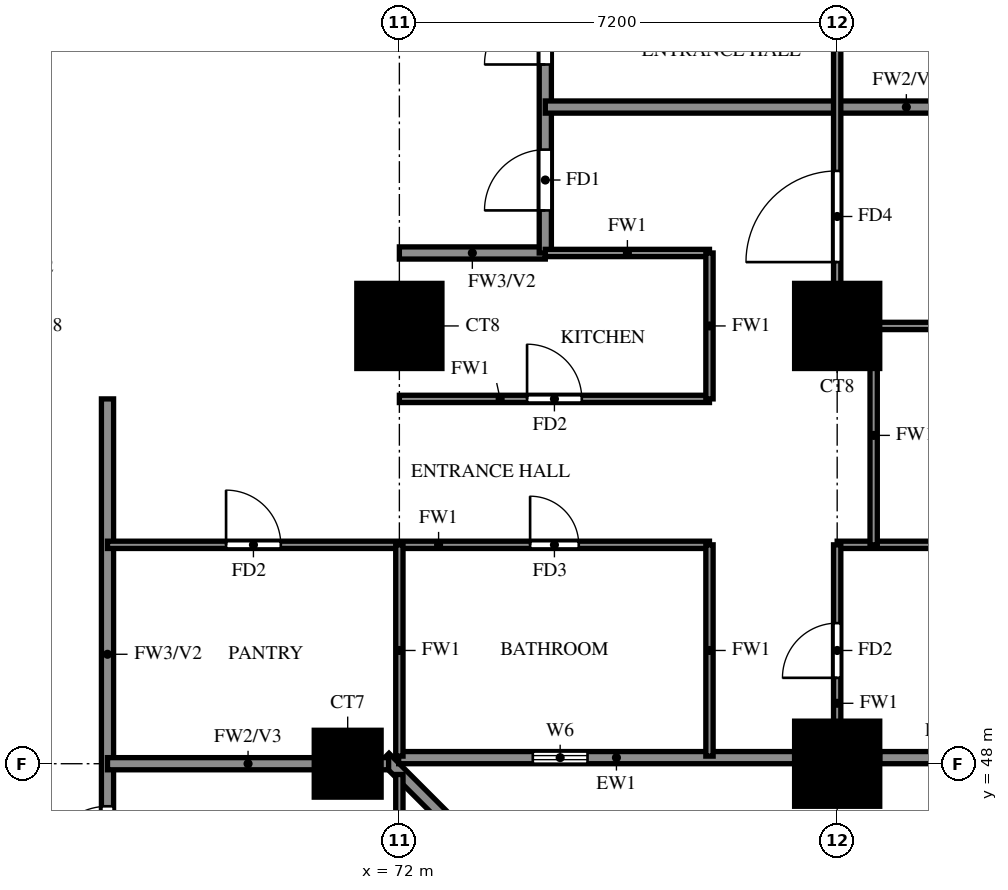
"""IFC4 building model, lengths in metres.
Left out: names, types, materials, properties, quantities, classifications, styles, units other than length and angle.
Written with IfcOpenShell. Run it as: python <this file> out.ifc"""

import sys

from ifc_helpers import new_model, si_unit, direction, frame, frame_2d, origin, origin_2d, place, context, subcontext, project, spatial, rectangle, extrude, source, transform, mapped, element, fill, save


model = new_model("IFC4")
c1 = context("Model", 3, precision=1e-05, world=origin(), true_north=direction((0.0, 1.0)))
c2 = subcontext(c1, "Body", "Model", "MODEL_VIEW")
j1 = project(units=[si_unit("LENGTHUNIT", "METRE"), si_unit("PLANEANGLEUNIT", "RADIAN")], contexts=[c1])
p1 = place(None, origin())
s1 = spatial("IfcSite", under=j1, at=p1, CompositionType="ELEMENT")
p2 = place(p1, origin())
s2 = spatial("IfcBuilding", under=s1, at=p2, CompositionType="ELEMENT")
p3 = place(p2, frame((0.0, 0.0, 51.5)))
s3 = spatial("IfcBuildingStorey", under=s2, at=p3, CompositionType="ELEMENT", Elevation=51.5)
m1 = source(origin(), c2, "Body", "SweptSolid", [
    extrude(rectangle(XDim=1.1, YDim=1.1, at=origin_2d()), origin(), (0.0, 0.0, 1.0), 3.18),
])
p4 = place(p3, frame((71.15, 48.0, 0.0), z_axis=(0.0, 0.0, 1.0), x_axis=(1.0, 0.0, 0.0)))
e1 = element("IfcColumn", 1, at=p4, inside=s3, PredefinedType="COLUMN", context=c2, shape_type="MappedRepresentation", body=[
    mapped(m1, transform((0.0, 0.0, 0.0))),
])
m2 = source(origin(), c2, "Body", "SweptSolid", [
    extrude(rectangle(XDim=1.4, YDim=1.4, at=origin_2d()), origin(), (0.0, 0.0, 1.0), 3.18),
])
for number, where, z_axis, x_axis in (
    (2, (79.2, 48.0, 0.0), (0.0, 0.0, 1.0), (1.0, 0.0, 0.0)),
    (3, (72.0, 55.2, 0.0), (0.0, 0.0, 1.0), (1.0, 0.0, 0.0)),
    (4, (79.2, 55.2, 0.0), (0.0, 0.0, 1.0), (1.0, 0.0, 0.0)),
):
    element("IfcColumn", number, at=place(p3, frame(where, z_axis=z_axis, x_axis=x_axis)), inside=s3, PredefinedType="COLUMN", context=c2, shape_type="MappedRepresentation", body=[
        mapped(m2, transform((0.0, 0.0, 0.0))),
    ])
p5 = place(p3, frame((78.74, 41.118, 0.0), z_axis=(0.0, 0.0, 1.0), x_axis=(-0.707106781187, 0.707106781187, 0.0)))
e5 = element("IfcWall", 5, at=p5, inside=s3, PredefinedType="SOLIDWALL", context=c2, shape_type="SweptSolid", body=[
    extrude(rectangle(XDim=9.874, YDim=0.2, at=frame_2d((4.937, 0.0))), origin(), (0.0, 0.0, 1.0), 3.18),
])
p6 = place(p5, frame((2.264, 0.0, 0.6)))
e6 = element("IfcOpeningElement", 6, at=p6, cuts=e5, PredefinedType="OPENING", context=c2, shape_type="SweptSolid", body=[
    extrude(rectangle(XDim=2.4, YDim=2.4, at=frame_2d((1.2, 1.2))), frame((0.0, 0.11, 0.0), z_axis=(0.0, -1.0, 0.0), x_axis=(1.0, 0.0, 0.0)), (0.0, 0.0, 1.0), 0.22),
])
p7 = place(p5, frame((5.836, 0.0, 0.6)))
e7 = element("IfcOpeningElement", 7, at=p7, cuts=e5, PredefinedType="OPENING", context=c2, shape_type="SweptSolid", body=[
    extrude(rectangle(XDim=2.4, YDim=2.4, at=frame_2d((1.2, 1.2))), frame((0.0, 0.11, 0.0), z_axis=(0.0, -1.0, 0.0), x_axis=(1.0, 0.0, 0.0)), (0.0, 0.0, 1.0), 0.22),
])
p8 = place(p3, frame((71.989, 48.1, 0.0), z_axis=(0.0, 0.0, 1.0), x_axis=(1.0, 0.0, 0.0)))
e8 = element("IfcWall", 8, at=p8, inside=s3, PredefinedType="SOLIDWALL", context=c2, shape_type="SweptSolid", body=[
    extrude(rectangle(XDim=6.511, YDim=0.2, at=frame_2d((3.256, 0.0))), origin(), (0.0, 0.0, 1.0), 3.18),
])
p9 = place(p8, frame((2.206, 0.0, 1.5)))
e9 = element("IfcOpeningElement", 9, at=p9, cuts=e8, PredefinedType="OPENING", context=c2, shape_type="SweptSolid", body=[
    extrude(rectangle(XDim=0.9, YDim=0.9, at=frame_2d((0.45, 0.45))), frame((0.0, 0.11, 0.0), z_axis=(0.0, -1.0, 0.0), x_axis=(1.0, 0.0, 0.0)), (0.0, 0.0, 1.0), 0.22),
])
p10 = place(p3, frame((79.9, 48.1, 0.0), z_axis=(0.0, 0.0, 1.0), x_axis=(1.0, 0.0, 0.0)))
e10 = element("IfcWall", 10, at=p10, inside=s3, PredefinedType="SOLIDWALL", context=c2, shape_type="SweptSolid", body=[
    extrude(rectangle(XDim=5.35, YDim=0.2, at=frame_2d((2.675, 0.0))), origin(), (0.0, 0.0, 1.0), 3.18),
])
p11 = place(p10, frame((1.475, 0.0, 0.6)))
e11 = element("IfcOpeningElement", 11, at=p11, cuts=e10, PredefinedType="OPENING", context=c2, shape_type="SweptSolid", body=[
    extrude(rectangle(XDim=2.4, YDim=2.4, at=frame_2d((1.2, 1.2))), frame((0.0, 0.11, 0.0), z_axis=(0.0, -1.0, 0.0), x_axis=(1.0, 0.0, 0.0)), (0.0, 0.0, 1.0), 0.22),
])
p12 = place(p3, frame((72.0, 56.4, 0.0), z_axis=(0.0, 0.0, 1.0), x_axis=(1.0, 0.0, 0.0)))
e12 = element("IfcWall", 12, at=p12, inside=s3, PredefinedType="SOLIDWALL", context=c2, shape_type="SweptSolid", body=[
    extrude(rectangle(XDim=2.4, YDim=0.2, at=frame_2d((1.2, 0.0))), origin(), (0.0, 0.0, 1.0), 3.18),
])
p13 = place(p3, frame((67.2, 45.6, 0.0), z_axis=(0.0, 0.0, 1.0), x_axis=(0.0, 1.0, 0.0)))
e13 = element("IfcWall", 13, at=p13, inside=s3, PredefinedType="SOLIDWALL", context=c2, shape_type="SweptSolid", body=[
    extrude(rectangle(XDim=8.4, YDim=0.2, at=frame_2d((4.2, 0.0))), origin(), (0.0, 0.0, 1.0), 3.18),
])
p14 = place(p13, frame((0.7, 0.0, 0.0)))
e14 = element("IfcOpeningElement", 14, at=p14, cuts=e13, PredefinedType="OPENING", context=c2, shape_type="SweptSolid", body=[
    extrude(rectangle(XDim=1.0, YDim=2.1, at=frame_2d((0.5, 1.05))), frame((0.0, 0.11, 0.0), z_axis=(0.0, -1.0, 0.0), x_axis=(1.0, 0.0, 0.0)), (0.0, 0.0, 1.0), 0.22),
])
p15 = place(p3, frame((74.4, 56.4, 0.0), z_axis=(0.0, 0.0, 1.0), x_axis=(0.0, 1.0, 0.0)))
e15 = element("IfcWall", 15, at=p15, inside=s3, PredefinedType="SOLIDWALL", context=c2, shape_type="SweptSolid", body=[
    extrude(rectangle(XDim=9.6, YDim=0.2, at=frame_2d((4.8, 0.0))), origin(), (0.0, 0.0, 1.0), 3.18),
])
p16 = place(p15, frame((0.7, 0.0, 0.0)))
e16 = element("IfcOpeningElement", 16, at=p16, cuts=e15, PredefinedType="OPENING", context=c2, shape_type="SweptSolid", body=[
    extrude(rectangle(XDim=1.0, YDim=2.1, at=frame_2d((0.5, 1.05))), frame((0.0, 0.11, 0.0), z_axis=(0.0, -1.0, 0.0), x_axis=(1.0, 0.0, 0.0)), (0.0, 0.0, 1.0), 0.22),
])
p17 = place(p15, frame((3.1, 0.0, 0.0)))
e17 = element("IfcOpeningElement", 17, at=p17, cuts=e15, PredefinedType="OPENING", context=c2, shape_type="SweptSolid", body=[
    extrude(rectangle(XDim=1.0, YDim=2.1, at=frame_2d((0.5, 1.05))), frame((0.0, 0.11, 0.0), z_axis=(0.0, -1.0, 0.0), x_axis=(1.0, 0.0, 0.0)), (0.0, 0.0, 1.0), 0.22),
])
p18 = place(p3, frame((67.2, 48.0, 0.0), z_axis=(0.0, 0.0, 1.0), x_axis=(1.0, 0.0, 0.0)))
e18 = element("IfcWall", 18, at=p18, inside=s3, PredefinedType="SOLIDWALL", context=c2, shape_type="SweptSolid", body=[
    extrude(rectangle(XDim=4.623, YDim=0.2, at=frame_2d((2.312, 0.0))), origin(), (0.0, 0.0, 1.0), 3.18),
])
p19 = place(p3, frame((74.4, 58.8, 0.0), z_axis=(0.0, 0.0, 1.0), x_axis=(1.0, 0.0, 0.0)))
e19 = element("IfcWall", 19, at=p19, inside=s3, PredefinedType="SOLIDWALL", context=c2, shape_type="SweptSolid", body=[
    extrude(rectangle(XDim=11.875, YDim=0.2, at=frame_2d((5.938, 0.0))), origin(), (0.0, 0.0, 1.0), 2.28),
])
p20 = place(p3, frame((67.2, 51.6, 0.0), z_axis=(0.0, 0.0, 1.0), x_axis=(1.0, 0.0, 0.0)))
e20 = element("IfcWall", 20, at=p20, inside=s3, PredefinedType="PARTITIONING", context=c2, shape_type="SweptSolid", body=[
    extrude(rectangle(XDim=9.9, YDim=0.12, at=frame_2d((4.95, 0.0))), origin(), (0.0, 0.0, 1.0), 3.18),
])
p21 = place(p20, frame((6.95, 0.0, 0.0)))
e21 = element("IfcOpeningElement", 21, at=p21, cuts=e20, PredefinedType="OPENING", context=c2, shape_type="SweptSolid", body=[
    extrude(rectangle(XDim=0.8, YDim=2.1, at=frame_2d((0.4, 1.05))), frame((0.0, 0.07, 0.0), z_axis=(0.0, -1.0, 0.0), x_axis=(1.0, 0.0, 0.0)), (0.0, 0.0, 1.0), 0.14),
])
p22 = place(p20, frame((1.95, 0.0, 0.0)))
e22 = element("IfcOpeningElement", 22, at=p22, cuts=e20, PredefinedType="OPENING", context=c2, shape_type="SweptSolid", body=[
    extrude(rectangle(XDim=0.9, YDim=2.1, at=frame_2d((0.45, 1.05))), frame((0.0, 0.07, 0.0), z_axis=(0.0, -1.0, 0.0), x_axis=(1.0, 0.0, 0.0)), (0.0, 0.0, 1.0), 0.14),
])
p23 = place(p3, frame((79.2, 51.6, 0.0), z_axis=(0.0, 0.0, 1.0), x_axis=(1.0, 0.0, 0.0)))
e23 = element("IfcWall", 23, at=p23, inside=s3, PredefinedType="PARTITIONING", context=c2, shape_type="SweptSolid", body=[
    extrude(rectangle(XDim=7.075, YDim=0.12, at=frame_2d((3.538, 0.0))), origin(), (0.0, 0.0, 1.0), 2.28),
])
p24 = place(p23, frame((3.438, 0.0, 0.0)))
e24 = element("IfcOpeningElement", 24, at=p24, cuts=e23, PredefinedType="OPENING", context=c2, shape_type="SweptSolid", body=[
    extrude(rectangle(XDim=0.8, YDim=2.1, at=frame_2d((0.4, 1.05))), frame((0.0, 0.07, 0.0), z_axis=(0.0, -1.0, 0.0), x_axis=(1.0, 0.0, 0.0)), (0.0, 0.0, 1.0), 0.14),
])
p25 = place(p3, frame((72.0, 54.0, 0.0), z_axis=(0.0, 0.0, 1.0), x_axis=(1.0, 0.0, 0.0)))
e25 = element("IfcWall", 25, at=p25, inside=s3, PredefinedType="PARTITIONING", context=c2, shape_type="SweptSolid", body=[
    extrude(rectangle(XDim=5.1, YDim=0.12, at=frame_2d((2.55, 0.0))), origin(), (0.0, 0.0, 1.0), 3.18),
])
p26 = place(p25, frame((2.1, 0.0, 0.0)))
e26 = element("IfcOpeningElement", 26, at=p26, cuts=e25, PredefinedType="OPENING", context=c2, shape_type="SweptSolid", body=[
    extrude(rectangle(XDim=0.9, YDim=2.1, at=frame_2d((0.45, 1.05))), frame((0.0, 0.07, 0.0), z_axis=(0.0, -1.0, 0.0), x_axis=(1.0, 0.0, 0.0)), (0.0, 0.0, 1.0), 0.14),
])
p27 = place(p3, frame((79.2, 55.2, 0.0), z_axis=(0.0, 0.0, 1.0), x_axis=(1.0, 0.0, 0.0)))
e27 = element("IfcWall", 27, at=p27, inside=s3, PredefinedType="PARTITIONING", context=c2, shape_type="SweptSolid", body=[
    extrude(rectangle(XDim=7.075, YDim=0.12, at=frame_2d((3.538, 0.0))), origin(), (0.0, 0.0, 1.0), 3.18),
])
p28 = place(p3, frame((74.4, 56.4, 0.0), z_axis=(0.0, 0.0, 1.0), x_axis=(1.0, 0.0, 0.0)))
e28 = element("IfcWall", 28, at=p28, inside=s3, PredefinedType="PARTITIONING", context=c2, shape_type="SweptSolid", body=[
    extrude(rectangle(XDim=2.7, YDim=0.12, at=frame_2d((1.35, 0.0))), origin(), (0.0, 0.0, 1.0), 3.18),
])
p29 = place(p3, frame((72.0, 33.725, 0.0), z_axis=(0.0, 0.0, 1.0), x_axis=(0.0, 1.0, 0.0)))
e29 = element("IfcWall", 29, at=p29, inside=s3, PredefinedType="PARTITIONING", context=c2, shape_type="SweptSolid", body=[
    extrude(rectangle(XDim=14.098, YDim=0.12, at=frame_2d((7.049, 0.0))), origin(), (0.0, 0.0, 1.0), 2.28),
])
p30 = place(p29, frame((10.075, 0.0, 0.0)))
e30 = element("IfcOpeningElement", 30, at=p30, cuts=e29, PredefinedType="OPENING", context=c2, shape_type="SweptSolid", body=[
    extrude(rectangle(XDim=0.9, YDim=2.1, at=frame_2d((0.45, 1.05))), frame((0.0, 0.07, 0.0), z_axis=(0.0, -1.0, 0.0), x_axis=(1.0, 0.0, 0.0)), (0.0, 0.0, 1.0), 0.14),
])
for number, where, z_axis, x_axis in (
    (31, (72.0, 48.125, 0.0), (0.0, 0.0, 1.0), (0.0, 1.0, 0.0)),
    (32, (77.1, 48.125, 0.0), (0.0, 0.0, 1.0), (0.0, 1.0, 0.0)),
):
    element("IfcWall", number, at=place(p3, frame(where, z_axis=z_axis, x_axis=x_axis)), inside=s3, PredefinedType="PARTITIONING", context=c2, shape_type="SweptSolid", body=[
        extrude(rectangle(XDim=3.475, YDim=0.12, at=frame_2d((1.738, 0.0))), origin(), (0.0, 0.0, 1.0), 3.18),
    ])
p31 = place(p3, frame((77.1, 54.0, 0.0), z_axis=(0.0, 0.0, 1.0), x_axis=(0.0, 1.0, 0.0)))
e33 = element("IfcWall", 33, at=p31, inside=s3, PredefinedType="PARTITIONING", context=c2, shape_type="SweptSolid", body=[
    extrude(rectangle(XDim=2.4, YDim=0.12, at=frame_2d((1.2, 0.0))), origin(), (0.0, 0.0, 1.0), 3.18),
])
p32 = place(p3, frame((79.2, 48.125, 0.0), z_axis=(0.0, 0.0, 1.0), x_axis=(0.0, 1.0, 0.0)))
e34 = element("IfcWall", 34, at=p32, inside=s3, PredefinedType="PARTITIONING", context=c2, shape_type="SweptSolid", body=[
    extrude(rectangle(XDim=3.475, YDim=0.12, at=frame_2d((1.738, 0.0))), origin(), (0.0, 0.0, 1.0), 3.18),
])
p33 = place(p32, frame((1.288, 0.0, 0.0)))
e35 = element("IfcOpeningElement", 35, at=p33, cuts=e34, PredefinedType="OPENING", context=c2, shape_type="SweptSolid", body=[
    extrude(rectangle(XDim=0.9, YDim=2.1, at=frame_2d((0.45, 1.05))), frame((0.0, 0.07, 0.0), z_axis=(0.0, -1.0, 0.0), x_axis=(1.0, 0.0, 0.0)), (0.0, 0.0, 1.0), 0.14),
])
p34 = place(p3, frame((79.2, 55.2, 0.0), z_axis=(0.0, 0.0, 1.0), x_axis=(0.0, 1.0, 0.0)))
e36 = element("IfcWall", 36, at=p34, inside=s3, PredefinedType="PARTITIONING", context=c2, shape_type="SweptSolid", body=[
    extrude(rectangle(XDim=14.4, YDim=0.12, at=frame_2d((7.2, 0.0))), origin(), (0.0, 0.0, 1.0), 3.18),
])
p35 = place(p34, frame((1.05, 0.0, 0.0)))
e37 = element("IfcOpeningElement", 37, at=p35, cuts=e36, PredefinedType="OPENING", context=c2, shape_type="SweptSolid", body=[
    extrude(rectangle(XDim=1.5, YDim=2.1, at=frame_2d((0.75, 1.05))), frame((0.0, 0.07, 0.0), z_axis=(0.0, -1.0, 0.0), x_axis=(1.0, 0.0, 0.0)), (0.0, 0.0, 1.0), 0.14),
])
p36 = place(p34, frame((4.95, 0.0, 0.0)))
e38 = element("IfcOpeningElement", 38, at=p36, cuts=e36, PredefinedType="OPENING", context=c2, shape_type="SweptSolid", body=[
    extrude(rectangle(XDim=0.9, YDim=2.1, at=frame_2d((0.45, 1.05))), frame((0.0, 0.07, 0.0), z_axis=(0.0, -1.0, 0.0), x_axis=(1.0, 0.0, 0.0)), (0.0, 0.0, 1.0), 0.14),
])
p37 = place(p34, frame((10.35, 0.0, 0.0)))
e39 = element("IfcOpeningElement", 39, at=p37, cuts=e36, PredefinedType="OPENING", context=c2, shape_type="SweptSolid", body=[
    extrude(rectangle(XDim=0.9, YDim=2.1, at=frame_2d((0.45, 1.05))), frame((0.0, 0.07, 0.0), z_axis=(0.0, -1.0, 0.0), x_axis=(1.0, 0.0, 0.0)), (0.0, 0.0, 1.0), 0.14),
])
p38 = place(p3, frame((79.8, 51.6, 0.0), z_axis=(0.0, 0.0, 1.0), x_axis=(0.0, 1.0, 0.0)))
e40 = element("IfcWall", 40, at=p38, inside=s3, PredefinedType="PARTITIONING", context=c2, shape_type="SweptSolid", body=[
    extrude(rectangle(XDim=3.6, YDim=0.12, at=frame_2d((1.8, 0.0))), origin(), (0.0, 0.0, 1.0), 3.18),
])
p39 = place(p9, origin())
e41 = element("IfcWindow", 41, at=p39, inside=s3, PartitioningType="SINGLE_PANEL", PredefinedType="WINDOW", context=c2, shape_type="SweptSolid", body=[
    extrude(rectangle(XDim=0.9, YDim=0.9, at=frame_2d((0.45, 0.45))), frame((0.0, 0.03, 0.0), z_axis=(0.0, -1.0, 0.0), x_axis=(1.0, 0.0, 0.0)), (0.0, 0.0, 1.0), 0.06),
])
fill(e9, e41)
p40 = place(p16, origin())
e42 = element("IfcDoor", 42, at=p40, inside=s3, OperationType="SINGLE_SWING_LEFT", PredefinedType="DOOR", context=c2, shape_type="SweptSolid", body=[
    extrude(rectangle(XDim=1.0, YDim=2.1, at=frame_2d((0.5, 1.05))), frame((0.0, 0.025, 0.0), z_axis=(0.0, -1.0, 0.0), x_axis=(1.0, 0.0, 0.0)), (0.0, 0.0, 1.0), 0.05),
])
fill(e16, e42)
p41 = place(p33, origin())
e43 = element("IfcDoor", 43, at=p41, inside=s3, OperationType="SINGLE_SWING_RIGHT", PredefinedType="DOOR", context=c2, shape_type="SweptSolid", body=[
    extrude(rectangle(XDim=0.9, YDim=2.1, at=frame_2d((0.45, 1.05))), frame((0.0, 0.025, 0.0), z_axis=(0.0, -1.0, 0.0), x_axis=(1.0, 0.0, 0.0)), (0.0, 0.0, 1.0), 0.05),
])
fill(e35, e43)
p42 = place(p35, origin())
e44 = element("IfcDoor", 44, at=p42, inside=s3, OperationType="SINGLE_SWING_LEFT", PredefinedType="DOOR", context=c2, shape_type="SweptSolid", body=[
    extrude(rectangle(XDim=1.5, YDim=2.1, at=frame_2d((0.75, 1.05))), frame((0.0, 0.025, 0.0), z_axis=(0.0, -1.0, 0.0), x_axis=(1.0, 0.0, 0.0)), (0.0, 0.0, 1.0), 0.05),
])
fill(e37, e44)
p43 = place(p21, origin())
e45 = element("IfcDoor", 45, at=p43, inside=s3, OperationType="SINGLE_SWING_RIGHT", PredefinedType="DOOR", context=c2, shape_type="SweptSolid", body=[
    extrude(rectangle(XDim=0.8, YDim=2.1, at=frame_2d((0.4, 1.05))), frame((0.0, 0.025, 0.0), z_axis=(0.0, -1.0, 0.0), x_axis=(1.0, 0.0, 0.0)), (0.0, 0.0, 1.0), 0.05),
])
fill(e21, e45)
p44 = place(p26, origin())
e46 = element("IfcDoor", 46, at=p44, inside=s3, OperationType="SINGLE_SWING_LEFT", PredefinedType="DOOR", context=c2, shape_type="SweptSolid", body=[
    extrude(rectangle(XDim=0.9, YDim=2.1, at=frame_2d((0.45, 1.05))), frame((0.0, 0.025, 0.0), z_axis=(0.0, -1.0, 0.0), x_axis=(1.0, 0.0, 0.0)), (0.0, 0.0, 1.0), 0.05),
])
fill(e26, e46)
p45 = place(p22, origin())
e47 = element("IfcDoor", 47, at=p45, inside=s3, OperationType="SINGLE_SWING_LEFT", PredefinedType="DOOR", context=c2, shape_type="SweptSolid", body=[
    extrude(rectangle(XDim=0.9, YDim=2.1, at=frame_2d((0.45, 1.05))), frame((0.0, 0.025, 0.0), z_axis=(0.0, -1.0, 0.0), x_axis=(1.0, 0.0, 0.0)), (0.0, 0.0, 1.0), 0.05),
])
fill(e22, e47)
p46 = place(p17, origin())
e48 = element("IfcDoor", 48, at=p46, inside=s3, OperationType="SINGLE_SWING_LEFT", PredefinedType="DOOR", context=c2, shape_type="SweptSolid", body=[
    extrude(rectangle(XDim=1.0, YDim=2.1, at=frame_2d((0.5, 1.05))), frame((0.0, 0.025, 0.0), z_axis=(0.0, -1.0, 0.0), x_axis=(1.0, 0.0, 0.0)), (0.0, 0.0, 1.0), 0.05),
])
fill(e17, e48)
p47 = place(p14, origin())
e49 = element("IfcDoor", 49, at=p47, inside=s3, OperationType="SINGLE_SWING_LEFT", PredefinedType="DOOR", context=c2, shape_type="SweptSolid", body=[
    extrude(rectangle(XDim=1.0, YDim=2.1, at=frame_2d((0.5, 1.05))), frame((0.0, 0.025, 0.0), z_axis=(0.0, -1.0, 0.0), x_axis=(1.0, 0.0, 0.0)), (0.0, 0.0, 1.0), 0.05),
])
fill(e14, e49)
save(model, sys.argv[1])
